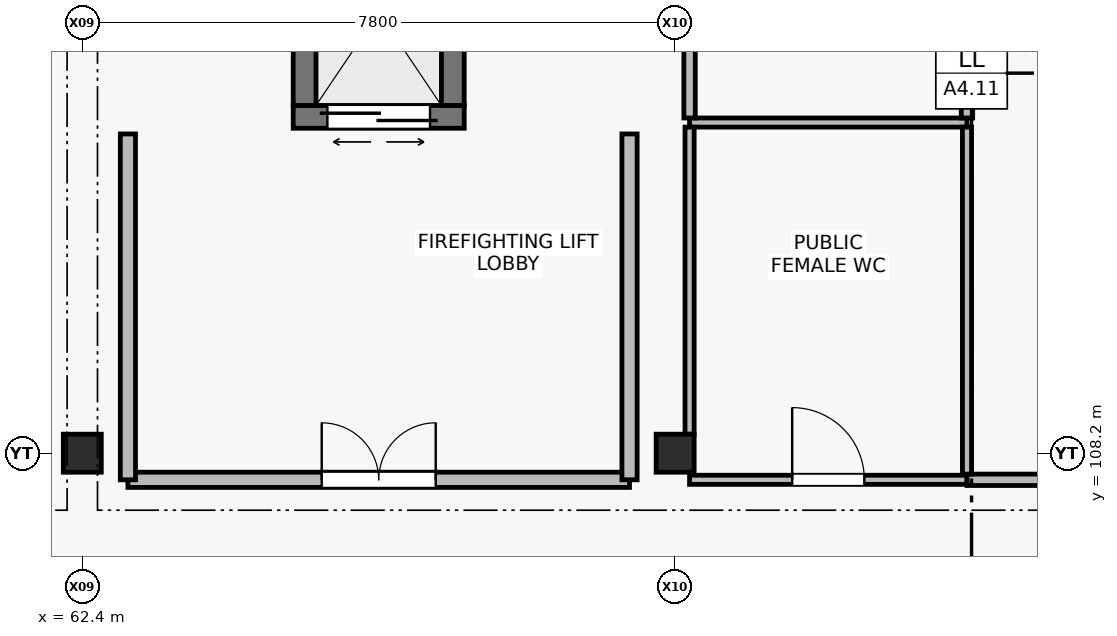
"""IFC4 building model, lengths in metres.
Left out: names, types, materials, properties, quantities, classifications, styles, units other than length and angle.
Written with IfcOpenShell. Run it as: python <this file> out.ifc"""

import sys

from ifc_helpers import new_model, si_unit, direction, frame, frame_2d, origin, origin_2d, place, context, subcontext, project, spatial, rectangle, extrude, element, fill, save


model = new_model("IFC4")
c1 = context("Model", 3, precision=1e-05, world=origin(), true_north=direction((0.0, 1.0)))
c2 = subcontext(c1, "Body", "Model", "MODEL_VIEW")
j1 = project(units=[si_unit("LENGTHUNIT", "METRE"), si_unit("PLANEANGLEUNIT", "RADIAN")], contexts=[c1])
p1 = place(None, origin())
s1 = spatial("IfcSite", under=j1, at=p1, CompositionType="ELEMENT")
p2 = place(p1, origin())
s2 = spatial("IfcBuilding", under=s1, at=p2, CompositionType="ELEMENT")
p3 = place(p2, frame((0.0, 0.0, 14.1)))
s3 = spatial("IfcBuildingStorey", under=s2, at=p3, CompositionType="ELEMENT", Elevation=14.1)
for number, where, z_axis, x_axis in (
    (1, (62.4, 108.2, 0.0), (0.0, 0.0, 1.0), (1.0, 0.0, 0.0)),
    (2, (70.2, 108.2, 0.0), (0.0, 0.0, 1.0), (1.0, 0.0, 0.0)),
):
    element("IfcColumn", number, at=place(p3, frame(where, z_axis=z_axis, x_axis=x_axis)), inside=s3, PredefinedType="COLUMN", context=c2, shape_type="SweptSolid", body=[
        extrude(rectangle(XDim=0.5, YDim=0.5, at=origin_2d()), origin(), (0.0, 0.0, 1.0), 4.5),
    ])
p4 = place(p3, frame((65.175, 112.625, 0.0), z_axis=(0.0, 0.0, 1.0), x_axis=(1.0, 0.0, 0.0)))
e3 = element("IfcWall", 3, at=p4, inside=s3, PredefinedType="SHEAR", context=c2, shape_type="SweptSolid", body=[
    extrude(rectangle(XDim=2.25, YDim=0.3, at=frame_2d((1.125, 0.0))), origin(), (0.0, 0.0, 1.0), 4.26),
])
p5 = place(p4, frame((0.45, 0.0, 0.0)))
e4 = element("IfcOpeningElement", 4, at=p5, cuts=e3, PredefinedType="OPENING", context=c2, shape_type="SweptSolid", body=[
    extrude(rectangle(XDim=1.35, YDim=2.3, at=frame_2d((0.675, 1.15))), frame((0.0, 0.16, 0.0), z_axis=(0.0, -1.0, 0.0), x_axis=(1.0, 0.0, 0.0)), (0.0, 0.0, 1.0), 0.32),
])
for number, where, z_axis, x_axis in (
    (5, (65.325, 115.225, 0.0), (0.0, 0.0, 1.0), (0.0, -1.0, 0.0)),
    (6, (67.275, 112.775, 0.0), (0.0, 0.0, 1.0), (0.0, 1.0, 0.0)),
):
    element("IfcWall", number, at=place(p3, frame(where, z_axis=z_axis, x_axis=x_axis)), inside=s3, PredefinedType="SHEAR", context=c2, shape_type="SweptSolid", body=[
        extrude(rectangle(XDim=2.45, YDim=0.3, at=frame_2d((1.225, 0.0))), origin(), (0.0, 0.0, 1.0), 4.26),
    ])
p6 = place(p3, frame((63.0, 107.85, 0.0), z_axis=(0.0, 0.0, 1.0), x_axis=(1.0, 0.0, 0.0)))
e7 = element("IfcWall", 7, at=p6, inside=s3, PredefinedType="SOLIDWALL", context=c2, shape_type="SweptSolid", body=[
    extrude(rectangle(XDim=6.6, YDim=0.2, at=frame_2d((3.3, 0.0))), origin(), (0.0, 0.0, 1.0), 3.72),
])
p7 = place(p6, frame((2.55, 0.0, 0.0)))
e8 = element("IfcOpeningElement", 8, at=p7, cuts=e7, PredefinedType="OPENING", context=c2, shape_type="SweptSolid", body=[
    extrude(rectangle(XDim=1.5, YDim=2.2, at=frame_2d((0.75, 1.1))), frame((0.0, 0.11, 0.0), z_axis=(0.0, -1.0, 0.0), x_axis=(1.0, 0.0, 0.0)), (0.0, 0.0, 1.0), 0.22),
])
for number, where, z_axis, x_axis in (
    (9, (63.0, 112.4, 0.0), (0.0, 0.0, 1.0), (0.0, -1.0, 0.0)),
    (10, (69.6, 107.85, 0.0), (0.0, 0.0, 1.0), (0.0, 1.0, 0.0)),
):
    element("IfcWall", number, at=place(p3, frame(where, z_axis=z_axis, x_axis=x_axis)), inside=s3, PredefinedType="SOLIDWALL", context=c2, shape_type="SweptSolid", body=[
        extrude(rectangle(XDim=4.55, YDim=0.2, at=frame_2d((2.275, 0.0))), origin(), (0.0, 0.0, 1.0), 4.26),
    ])
p8 = place(p3, frame((70.39, 107.85, 0.0), z_axis=(0.0, 0.0, 1.0), x_axis=(1.0, 0.0, 0.0)))
e11 = element("IfcWall", 11, at=p8, inside=s3, PredefinedType="PARTITIONING", context=c2, shape_type="SweptSolid", body=[
    extrude(rectangle(XDim=3.65, YDim=0.12, at=frame_2d((1.825, 0.0))), origin(), (0.0, 0.0, 1.0), 3.72),
])
p9 = place(p8, frame((1.35, 0.0, 0.0)))
e12 = element("IfcOpeningElement", 12, at=p9, cuts=e11, PredefinedType="OPENING", context=c2, shape_type="SweptSolid", body=[
    extrude(rectangle(XDim=0.95, YDim=2.1, at=frame_2d((0.475, 1.05))), frame((0.0, 0.07, 0.0), z_axis=(0.0, -1.0, 0.0), x_axis=(1.0, 0.0, 0.0)), (0.0, 0.0, 1.0), 0.14),
])
p10 = place(p3, frame((70.39, 112.55, 0.0), z_axis=(0.0, 0.0, 1.0), x_axis=(1.0, 0.0, 0.0)))
e13 = element("IfcWall", 13, at=p10, inside=s3, PredefinedType="PARTITIONING", context=c2, shape_type="SweptSolid", body=[
    extrude(rectangle(XDim=3.65, YDim=0.12, at=frame_2d((1.825, 0.0))), origin(), (0.0, 0.0, 1.0), 4.26),
])
p11 = place(p3, frame((74.04, 107.85, 0.0), z_axis=(0.0, 0.0, 1.0), x_axis=(1.0, 0.0, 0.0)))
e14 = element("IfcWall", 14, at=p11, inside=s3, PredefinedType="PARTITIONING", context=c2, shape_type="SweptSolid", body=[
    extrude(rectangle(XDim=4.23, YDim=0.15, at=frame_2d((2.115, 0.0))), origin(), (0.0, 0.0, 1.0), 3.72),
])
p12 = place(p11, frame((1.575, 0.0, 0.0)))
e15 = element("IfcOpeningElement", 15, at=p12, cuts=e14, PredefinedType="OPENING", context=c2, shape_type="SweptSolid", body=[
    extrude(rectangle(XDim=1.08, YDim=2.2, at=frame_2d((0.54, 1.1))), frame((0.0, 0.085, 0.0), z_axis=(0.0, -1.0, 0.0), x_axis=(1.0, 0.0, 0.0)), (0.0, 0.0, 1.0), 0.17),
])
p13 = place(p3, frame((70.39, 108.45, 0.0), z_axis=(0.0, 0.0, 1.0), x_axis=(0.0, 1.0, 0.0)))
e16 = element("IfcWall", 16, at=p13, inside=s3, PredefinedType="PARTITIONING", context=c2, shape_type="SweptSolid", body=[
    extrude(rectangle(XDim=4.04, YDim=0.12, at=frame_2d((2.02, 0.0))), origin(), (0.0, 0.0, 1.0), 3.77),
])
p14 = place(p3, frame((74.04, 107.925, 0.0), z_axis=(0.0, 0.0, 1.0), x_axis=(0.0, 1.0, 0.0)))
e17 = element("IfcWall", 17, at=p14, inside=s3, PredefinedType="PARTITIONING", context=c2, shape_type="SweptSolid", body=[
    extrude(rectangle(XDim=4.565, YDim=0.12, at=frame_2d((2.282, 0.0))), origin(), (0.0, 0.0, 1.0), 4.26),
])
p15 = place(p3, frame((74.04, 112.61, 0.0), z_axis=(0.0, 0.0, 1.0), x_axis=(0.0, 1.0, 0.0)))
e18 = element("IfcWall", 18, at=p15, inside=s3, PredefinedType="PARTITIONING", context=c2, shape_type="SweptSolid", body=[
    extrude(rectangle(XDim=3.2, YDim=0.15, at=frame_2d((1.6, 0.0))), origin(), (0.0, 0.0, 1.0), 4.26),
])
p16 = place(p3, frame((70.39, 112.61, 0.0), z_axis=(0.0, 0.0, 1.0), x_axis=(0.0, 1.0, 0.0)))
e19 = element("IfcWall", 19, at=p16, inside=s3, PredefinedType="PARTITIONING", context=c2, shape_type="SweptSolid", body=[
    extrude(rectangle(XDim=3.14, YDim=0.15, at=frame_2d((1.57, 0.0))), origin(), (0.0, 0.0, 1.0), 3.77),
])
p17 = place(p5, origin())
e20 = element("IfcDoor", 20, at=p17, inside=s3, OperationType="DOUBLE_DOOR_SLIDING", PredefinedType="DOOR", context=c2, shape_type="SweptSolid", body=[
    extrude(rectangle(XDim=1.35, YDim=2.3, at=frame_2d((0.675, 1.15))), frame((0.0, 0.025, 0.0), z_axis=(0.0, -1.0, 0.0), x_axis=(1.0, 0.0, 0.0)), (0.0, 0.0, 1.0), 0.05),
])
fill(e4, e20)
p18 = place(p7, origin())
e21 = element("IfcDoor", 21, at=p18, inside=s3, OperationType="DOUBLE_DOOR_SINGLE_SWING", PredefinedType="DOOR", context=c2, shape_type="SweptSolid", body=[
    extrude(rectangle(XDim=1.5, YDim=2.2, at=frame_2d((0.75, 1.1))), frame((0.0, 0.025, 0.0), z_axis=(0.0, -1.0, 0.0), x_axis=(1.0, 0.0, 0.0)), (0.0, 0.0, 1.0), 0.05),
])
fill(e8, e21)
p19 = place(p9, origin())
e22 = element("IfcDoor", 22, at=p19, inside=s3, OperationType="SINGLE_SWING_LEFT", PredefinedType="DOOR", context=c2, shape_type="SweptSolid", body=[
    extrude(rectangle(XDim=0.95, YDim=2.1, at=frame_2d((0.475, 1.05))), frame((0.0, 0.025, 0.0), z_axis=(0.0, -1.0, 0.0), x_axis=(1.0, 0.0, 0.0)), (0.0, 0.0, 1.0), 0.05),
])
fill(e12, e22)
save(model, sys.argv[1])
